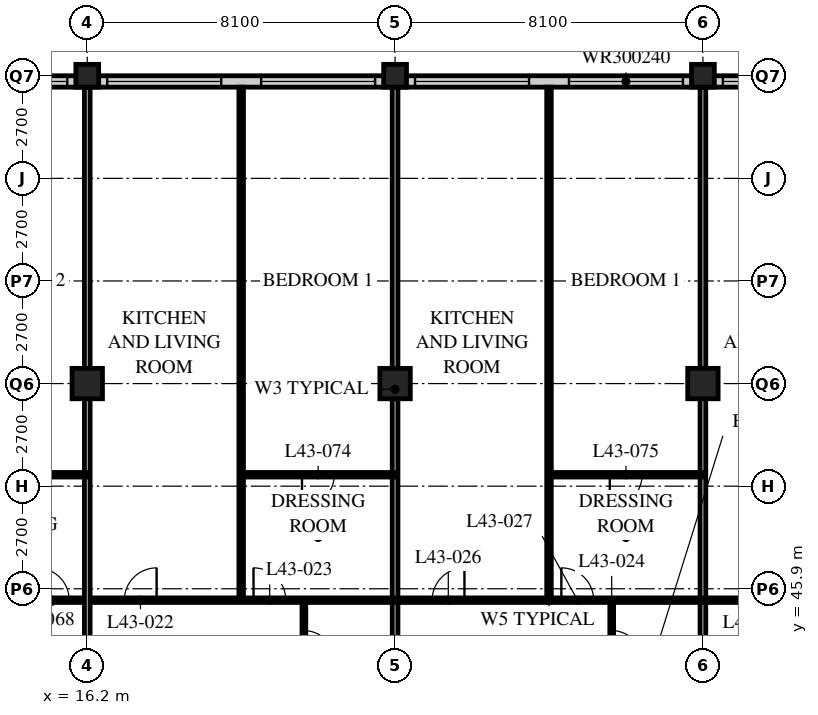
"""IFC4 building model, lengths in metres.
Left out: names, types, materials, properties, quantities, classifications, styles, units other than length and angle.
Written with IfcOpenShell. Run it as: python <this file> out.ifc"""

import sys

from ifc_helpers import new_model, si_unit, direction, frame, frame_2d, origin, origin_2d, place, context, subcontext, project, spatial, rectangle, hollow_rectangle, extrude, element, fill, save


model = new_model("IFC4")
c1 = context("Model", 3, precision=1e-05, world=origin(), true_north=direction((0.0, 1.0)))
c2 = subcontext(c1, "Body", "Model", "MODEL_VIEW")
j1 = project(units=[si_unit("LENGTHUNIT", "METRE"), si_unit("PLANEANGLEUNIT", "RADIAN")], contexts=[c1])
p1 = place(None, origin())
s1 = spatial("IfcSite", under=j1, at=p1, CompositionType="ELEMENT")
p2 = place(p1, origin())
s2 = spatial("IfcBuilding", under=s1, at=p2, CompositionType="ELEMENT")
p3 = place(p2, frame((0.0, 0.0, 170.4)))
s3 = spatial("IfcBuildingStorey", under=s2, at=p3, CompositionType="ELEMENT", Elevation=170.4)
p4 = place(p3, frame((16.2, 51.3, 0.0), z_axis=(0.0, 0.0, 1.0), x_axis=(1.0, 0.0, 0.0)))
e1 = element("IfcColumn", 1, at=p4, inside=s3, PredefinedType="COLUMN", context=c2, shape_type="SweptSolid", body=[
    extrude(hollow_rectangle(XDim=0.8, YDim=0.8, WallThickness=0.08, at=origin_2d()), origin(), (0.0, 0.0, 1.0), 3.6),
])
p5 = place(p3, frame((16.2, 59.4, 0.0), z_axis=(0.0, 0.0, 1.0), x_axis=(1.0, 0.0, 0.0)))
e2 = element("IfcColumn", 2, at=p5, inside=s3, PredefinedType="COLUMN", context=c2, shape_type="SweptSolid", body=[
    extrude(hollow_rectangle(XDim=0.6, YDim=0.6, WallThickness=0.05, at=origin_2d()), origin(), (0.0, 0.0, 1.0), 3.6),
])
p6 = place(p3, frame((24.3, 51.3, 0.0), z_axis=(0.0, 0.0, 1.0), x_axis=(1.0, 0.0, 0.0)))
e3 = element("IfcColumn", 3, at=p6, inside=s3, PredefinedType="COLUMN", context=c2, shape_type="SweptSolid", body=[
    extrude(hollow_rectangle(XDim=0.8, YDim=0.8, WallThickness=0.08, at=origin_2d()), origin(), (0.0, 0.0, 1.0), 3.6),
])
p7 = place(p3, frame((24.3, 59.4, 0.0), z_axis=(0.0, 0.0, 1.0), x_axis=(1.0, 0.0, 0.0)))
e4 = element("IfcColumn", 4, at=p7, inside=s3, PredefinedType="COLUMN", context=c2, shape_type="SweptSolid", body=[
    extrude(hollow_rectangle(XDim=0.6, YDim=0.6, WallThickness=0.05, at=origin_2d()), origin(), (0.0, 0.0, 1.0), 3.6),
])
p8 = place(p3, frame((32.4, 51.3, 0.0), z_axis=(0.0, 0.0, 1.0), x_axis=(1.0, 0.0, 0.0)))
e5 = element("IfcColumn", 5, at=p8, inside=s3, PredefinedType="COLUMN", context=c2, shape_type="SweptSolid", body=[
    extrude(hollow_rectangle(XDim=0.8, YDim=0.8, WallThickness=0.08, at=origin_2d()), origin(), (0.0, 0.0, 1.0), 3.6),
])
p9 = place(p3, frame((32.4, 59.4, 0.0), z_axis=(0.0, 0.0, 1.0), x_axis=(1.0, 0.0, 0.0)))
e6 = element("IfcColumn", 6, at=p9, inside=s3, PredefinedType="COLUMN", context=c2, shape_type="SweptSolid", body=[
    extrude(hollow_rectangle(XDim=0.6, YDim=0.6, WallThickness=0.05, at=origin_2d()), origin(), (0.0, 0.0, 1.0), 3.6),
])
p10 = place(p3, frame((48.3, 59.25, 0.0), z_axis=(0.0, 0.0, 1.0), x_axis=(-1.0, 0.0, 0.0)))
e7 = element("IfcWall", 7, at=p10, inside=s3, PredefinedType="SOLIDWALL", context=c2, shape_type="SweptSolid", body=[
    extrude(rectangle(XDim=40.2, YDim=0.3, at=frame_2d((20.1, 0.0))), origin(), (0.0, 0.0, 1.0), 3.39),
])
p11 = place(p10, frame((0.225, 0.0, 0.6)))
e8 = element("IfcOpeningElement", 8, at=p11, cuts=e7, PredefinedType="OPENING", context=c2, shape_type="SweptSolid", body=[
    extrude(rectangle(XDim=3.0, YDim=2.4, at=frame_2d((1.5, 1.2))), frame((0.0, 0.16, 0.0), z_axis=(0.0, -1.0, 0.0), x_axis=(1.0, 0.0, 0.0)), (0.0, 0.0, 1.0), 0.32),
])
p12 = place(p10, frame((4.275, 0.0, 0.6)))
e9 = element("IfcOpeningElement", 9, at=p12, cuts=e7, PredefinedType="OPENING", context=c2, shape_type="SweptSolid", body=[
    extrude(rectangle(XDim=3.0, YDim=2.4, at=frame_2d((1.5, 1.2))), frame((0.0, 0.16, 0.0), z_axis=(0.0, -1.0, 0.0), x_axis=(1.0, 0.0, 0.0)), (0.0, 0.0, 1.0), 0.32),
])
p13 = place(p10, frame((8.325, 0.0, 0.6)))
e10 = element("IfcOpeningElement", 10, at=p13, cuts=e7, PredefinedType="OPENING", context=c2, shape_type="SweptSolid", body=[
    extrude(rectangle(XDim=3.0, YDim=2.4, at=frame_2d((1.5, 1.2))), frame((0.0, 0.16, 0.0), z_axis=(0.0, -1.0, 0.0), x_axis=(1.0, 0.0, 0.0)), (0.0, 0.0, 1.0), 0.32),
])
p14 = place(p10, frame((12.375, 0.0, 0.6)))
e11 = element("IfcOpeningElement", 11, at=p14, cuts=e7, PredefinedType="OPENING", context=c2, shape_type="SweptSolid", body=[
    extrude(rectangle(XDim=3.0, YDim=2.4, at=frame_2d((1.5, 1.2))), frame((0.0, 0.16, 0.0), z_axis=(0.0, -1.0, 0.0), x_axis=(1.0, 0.0, 0.0)), (0.0, 0.0, 1.0), 0.32),
])
p15 = place(p10, frame((16.425, 0.0, 0.6)))
e12 = element("IfcOpeningElement", 12, at=p15, cuts=e7, PredefinedType="OPENING", context=c2, shape_type="SweptSolid", body=[
    extrude(rectangle(XDim=3.0, YDim=2.4, at=frame_2d((1.5, 1.2))), frame((0.0, 0.16, 0.0), z_axis=(0.0, -1.0, 0.0), x_axis=(1.0, 0.0, 0.0)), (0.0, 0.0, 1.0), 0.32),
])
p16 = place(p10, frame((20.475, 0.0, 0.6)))
e13 = element("IfcOpeningElement", 13, at=p16, cuts=e7, PredefinedType="OPENING", context=c2, shape_type="SweptSolid", body=[
    extrude(rectangle(XDim=3.0, YDim=2.4, at=frame_2d((1.5, 1.2))), frame((0.0, 0.16, 0.0), z_axis=(0.0, -1.0, 0.0), x_axis=(1.0, 0.0, 0.0)), (0.0, 0.0, 1.0), 0.32),
])
p17 = place(p10, frame((24.525, 0.0, 0.6)))
e14 = element("IfcOpeningElement", 14, at=p17, cuts=e7, PredefinedType="OPENING", context=c2, shape_type="SweptSolid", body=[
    extrude(rectangle(XDim=3.0, YDim=2.4, at=frame_2d((1.5, 1.2))), frame((0.0, 0.16, 0.0), z_axis=(0.0, -1.0, 0.0), x_axis=(1.0, 0.0, 0.0)), (0.0, 0.0, 1.0), 0.32),
])
p18 = place(p10, frame((28.575, 0.0, 0.6)))
e15 = element("IfcOpeningElement", 15, at=p18, cuts=e7, PredefinedType="OPENING", context=c2, shape_type="SweptSolid", body=[
    extrude(rectangle(XDim=3.0, YDim=2.4, at=frame_2d((1.5, 1.2))), frame((0.0, 0.16, 0.0), z_axis=(0.0, -1.0, 0.0), x_axis=(1.0, 0.0, 0.0)), (0.0, 0.0, 1.0), 0.32),
])
p19 = place(p10, frame((32.625, 0.0, 0.6)))
e16 = element("IfcOpeningElement", 16, at=p19, cuts=e7, PredefinedType="OPENING", context=c2, shape_type="SweptSolid", body=[
    extrude(rectangle(XDim=3.0, YDim=2.4, at=frame_2d((1.5, 1.2))), frame((0.0, 0.16, 0.0), z_axis=(0.0, -1.0, 0.0), x_axis=(1.0, 0.0, 0.0)), (0.0, 0.0, 1.0), 0.32),
])
p20 = place(p10, frame((36.675, 0.0, 0.6)))
e17 = element("IfcOpeningElement", 17, at=p20, cuts=e7, PredefinedType="OPENING", context=c2, shape_type="SweptSolid", body=[
    extrude(rectangle(XDim=3.0, YDim=2.4, at=frame_2d((1.5, 1.2))), frame((0.0, 0.16, 0.0), z_axis=(0.0, -1.0, 0.0), x_axis=(1.0, 0.0, 0.0)), (0.0, 0.0, 1.0), 0.32),
])
p21 = place(p3, frame((21.9, 43.2, 0.0), z_axis=(0.0, 0.0, 1.0), x_axis=(0.0, 1.0, 0.0)))
e18 = element("IfcWall", 18, at=p21, inside=s3, PredefinedType="PARTITIONING", context=c2, shape_type="SweptSolid", body=[
    extrude(rectangle(XDim=2.4, YDim=0.1, at=frame_2d((1.2, 0.0))), origin(), (0.0, 0.0, 1.0), 3.39),
])
p22 = place(p21, frame((0.8, 0.0, 0.0)))
e19 = element("IfcOpeningElement", 19, at=p22, cuts=e18, PredefinedType="OPENING", context=c2, shape_type="SweptSolid", body=[
    extrude(rectangle(XDim=0.8, YDim=2.1, at=frame_2d((0.4, 1.05))), frame((0.0, 0.06, 0.0), z_axis=(0.0, -1.0, 0.0), x_axis=(1.0, 0.0, 0.0)), (0.0, 0.0, 1.0), 0.12),
])
p23 = place(p3, frame((20.25, 45.6, 0.0), z_axis=(0.0, 0.0, 1.0), x_axis=(0.0, 1.0, 0.0)))
e20 = element("IfcWall", 20, at=p23, inside=s3, PredefinedType="PARTITIONING", context=c2, shape_type="SweptSolid", body=[
    extrude(rectangle(XDim=13.5, YDim=0.12, at=frame_2d((6.75, 0.0))), origin(), (0.0, 0.0, 1.0), 3.39),
])
p24 = place(p3, frame((24.3, 43.2, 0.0), z_axis=(0.0, 0.0, 1.0), x_axis=(0.0, 1.0, 0.0)))
e21 = element("IfcWall", 21, at=p24, inside=s3, PredefinedType="PARTITIONING", context=c2, shape_type="SweptSolid", body=[
    extrude(rectangle(XDim=15.9, YDim=0.15, at=frame_2d((7.95, 0.0))), origin(), (0.0, 0.0, 1.0), 2.778),
])
p25 = place(p3, frame((30.0, 43.2, 0.0), z_axis=(0.0, 0.0, 1.0), x_axis=(0.0, 1.0, 0.0)))
e22 = element("IfcWall", 22, at=p25, inside=s3, PredefinedType="PARTITIONING", context=c2, shape_type="SweptSolid", body=[
    extrude(rectangle(XDim=2.4, YDim=0.1, at=frame_2d((1.2, 0.0))), origin(), (0.0, 0.0, 1.0), 3.39),
])
p26 = place(p25, frame((0.8, 0.0, 0.0)))
e23 = element("IfcOpeningElement", 23, at=p26, cuts=e22, PredefinedType="OPENING", context=c2, shape_type="SweptSolid", body=[
    extrude(rectangle(XDim=0.8, YDim=2.1, at=frame_2d((0.4, 1.05))), frame((0.0, 0.06, 0.0), z_axis=(0.0, -1.0, 0.0), x_axis=(1.0, 0.0, 0.0)), (0.0, 0.0, 1.0), 0.12),
])
p27 = place(p3, frame((28.35, 45.6, 0.0), z_axis=(0.0, 0.0, 1.0), x_axis=(0.0, 1.0, 0.0)))
e24 = element("IfcWall", 24, at=p27, inside=s3, PredefinedType="PARTITIONING", context=c2, shape_type="SweptSolid", body=[
    extrude(rectangle(XDim=13.5, YDim=0.12, at=frame_2d((6.75, 0.0))), origin(), (0.0, 0.0, 1.0), 3.39),
])
p28 = place(p3, frame((32.4, 43.2, 0.0), z_axis=(0.0, 0.0, 1.0), x_axis=(0.0, 1.0, 0.0)))
e25 = element("IfcWall", 25, at=p28, inside=s3, PredefinedType="PARTITIONING", context=c2, shape_type="SweptSolid", body=[
    extrude(rectangle(XDim=15.9, YDim=0.15, at=frame_2d((7.95, 0.0))), origin(), (0.0, 0.0, 1.0), 2.778),
])
p29 = place(p3, frame((8.15, 45.6, 0.0), z_axis=(0.0, 0.0, 1.0), x_axis=(1.0, 0.0, 0.0)))
e26 = element("IfcWall", 26, at=p29, inside=s3, PredefinedType="PARTITIONING", context=c2, shape_type="SweptSolid", body=[
    extrude(rectangle(XDim=40.4, YDim=0.12, at=frame_2d((20.2, 0.0))), origin(), (0.0, 0.0, 1.0), 3.39),
])
p30 = place(p29, frame((9.025, 0.0, 0.0)))
e27 = element("IfcOpeningElement", 27, at=p30, cuts=e26, PredefinedType="OPENING", context=c2, shape_type="SweptSolid", body=[
    extrude(rectangle(XDim=0.85, YDim=2.1, at=frame_2d((0.425, 1.05))), frame((0.0, 0.07, 0.0), z_axis=(0.0, -1.0, 0.0), x_axis=(1.0, 0.0, 0.0)), (0.0, 0.0, 1.0), 0.14),
])
p31 = place(p29, frame((12.425, 0.0, 0.0)))
e28 = element("IfcOpeningElement", 28, at=p31, cuts=e26, PredefinedType="OPENING", context=c2, shape_type="SweptSolid", body=[
    extrude(rectangle(XDim=0.85, YDim=2.1, at=frame_2d((0.425, 1.05))), frame((0.0, 0.07, 0.0), z_axis=(0.0, -1.0, 0.0), x_axis=(1.0, 0.0, 0.0)), (0.0, 0.0, 1.0), 0.14),
])
p32 = place(p29, frame((17.125, 0.0, 0.0)))
e29 = element("IfcOpeningElement", 29, at=p32, cuts=e26, PredefinedType="OPENING", context=c2, shape_type="SweptSolid", body=[
    extrude(rectangle(XDim=0.85, YDim=2.1, at=frame_2d((0.425, 1.05))), frame((0.0, 0.07, 0.0), z_axis=(0.0, -1.0, 0.0), x_axis=(1.0, 0.0, 0.0)), (0.0, 0.0, 1.0), 0.14),
])
p33 = place(p29, frame((20.525, 0.0, 0.0)))
e30 = element("IfcOpeningElement", 30, at=p33, cuts=e26, PredefinedType="OPENING", context=c2, shape_type="SweptSolid", body=[
    extrude(rectangle(XDim=0.85, YDim=2.1, at=frame_2d((0.425, 1.05))), frame((0.0, 0.07, 0.0), z_axis=(0.0, -1.0, 0.0), x_axis=(1.0, 0.0, 0.0)), (0.0, 0.0, 1.0), 0.14),
])
p34 = place(p29, frame((25.225, 0.0, 0.0)))
e31 = element("IfcOpeningElement", 31, at=p34, cuts=e26, PredefinedType="OPENING", context=c2, shape_type="SweptSolid", body=[
    extrude(rectangle(XDim=0.85, YDim=2.1, at=frame_2d((0.425, 1.05))), frame((0.0, 0.07, 0.0), z_axis=(0.0, -1.0, 0.0), x_axis=(1.0, 0.0, 0.0)), (0.0, 0.0, 1.0), 0.14),
])
p35 = place(p29, frame((28.625, 0.0, 0.0)))
e32 = element("IfcOpeningElement", 32, at=p35, cuts=e26, PredefinedType="OPENING", context=c2, shape_type="SweptSolid", body=[
    extrude(rectangle(XDim=0.85, YDim=2.1, at=frame_2d((0.425, 1.05))), frame((0.0, 0.07, 0.0), z_axis=(0.0, -1.0, 0.0), x_axis=(1.0, 0.0, 0.0)), (0.0, 0.0, 1.0), 0.14),
])
p36 = place(p29, frame((32.825, 0.0, 0.0)))
e33 = element("IfcOpeningElement", 33, at=p36, cuts=e26, PredefinedType="OPENING", context=c2, shape_type="SweptSolid", body=[
    extrude(rectangle(XDim=0.85, YDim=2.1, at=frame_2d((0.425, 1.05))), frame((0.0, 0.07, 0.0), z_axis=(0.0, -1.0, 0.0), x_axis=(1.0, 0.0, 0.0)), (0.0, 0.0, 1.0), 0.14),
])
p37 = place(p29, frame((36.675, 0.0, 0.0)))
e34 = element("IfcOpeningElement", 34, at=p37, cuts=e26, PredefinedType="OPENING", context=c2, shape_type="SweptSolid", body=[
    extrude(rectangle(XDim=0.85, YDim=2.1, at=frame_2d((0.425, 1.05))), frame((0.0, 0.07, 0.0), z_axis=(0.0, -1.0, 0.0), x_axis=(1.0, 0.0, 0.0)), (0.0, 0.0, 1.0), 0.14),
])
p38 = place(p29, frame((6.725, 0.0, 0.0)))
e35 = element("IfcOpeningElement", 35, at=p38, cuts=e26, PredefinedType="OPENING", context=c2, shape_type="SweptSolid", body=[
    extrude(rectangle(XDim=0.85, YDim=2.1, at=frame_2d((0.425, 1.05))), frame((0.0, 0.07, 0.0), z_axis=(0.0, -1.0, 0.0), x_axis=(1.0, 0.0, 0.0)), (0.0, 0.0, 1.0), 0.14),
])
p39 = place(p29, frame((2.875, 0.0, 0.0)))
e36 = element("IfcOpeningElement", 36, at=p39, cuts=e26, PredefinedType="OPENING", context=c2, shape_type="SweptSolid", body=[
    extrude(rectangle(XDim=0.85, YDim=2.1, at=frame_2d((0.425, 1.05))), frame((0.0, 0.07, 0.0), z_axis=(0.0, -1.0, 0.0), x_axis=(1.0, 0.0, 0.0)), (0.0, 0.0, 1.0), 0.14),
])
p40 = place(p3, frame((16.2, 43.2, 0.0), z_axis=(0.0, 0.0, 1.0), x_axis=(0.0, 1.0, 0.0)))
e37 = element("IfcWall", 37, at=p40, inside=s3, PredefinedType="PARTITIONING", context=c2, shape_type="SweptSolid", body=[
    extrude(rectangle(XDim=15.9, YDim=0.15, at=frame_2d((7.95, 0.0))), origin(), (0.0, 0.0, 1.0), 2.778),
])
p41 = place(p3, frame((20.25, 48.9, 0.0), z_axis=(0.0, 0.0, 1.0), x_axis=(1.0, 0.0, 0.0)))
e38 = element("IfcWall", 38, at=p41, inside=s3, PredefinedType="PARTITIONING", context=c2, shape_type="SweptSolid", body=[
    extrude(rectangle(XDim=4.05, YDim=0.12, at=frame_2d((2.025, 0.0))), origin(), (0.0, 0.0, 1.0), 3.39),
])
p42 = place(p41, frame((1.6, 0.0, 0.0)))
e39 = element("IfcOpeningElement", 39, at=p42, cuts=e38, PredefinedType="OPENING", context=c2, shape_type="SweptSolid", body=[
    extrude(rectangle(XDim=0.85, YDim=2.1, at=frame_2d((0.425, 1.05))), frame((0.0, 0.07, 0.0), z_axis=(0.0, -1.0, 0.0), x_axis=(1.0, 0.0, 0.0)), (0.0, 0.0, 1.0), 0.14),
])
p43 = place(p3, frame((28.35, 48.9, 0.0), z_axis=(0.0, 0.0, 1.0), x_axis=(1.0, 0.0, 0.0)))
e40 = element("IfcWall", 40, at=p43, inside=s3, PredefinedType="PARTITIONING", context=c2, shape_type="SweptSolid", body=[
    extrude(rectangle(XDim=4.05, YDim=0.12, at=frame_2d((2.025, 0.0))), origin(), (0.0, 0.0, 1.0), 3.39),
])
p44 = place(p43, frame((1.6, 0.0, 0.0)))
e41 = element("IfcOpeningElement", 41, at=p44, cuts=e40, PredefinedType="OPENING", context=c2, shape_type="SweptSolid", body=[
    extrude(rectangle(XDim=0.85, YDim=2.1, at=frame_2d((0.425, 1.05))), frame((0.0, 0.07, 0.0), z_axis=(0.0, -1.0, 0.0), x_axis=(1.0, 0.0, 0.0)), (0.0, 0.0, 1.0), 0.14),
])
p45 = place(p3, frame((12.15, 48.9, 0.0), z_axis=(0.0, 0.0, 1.0), x_axis=(1.0, 0.0, 0.0)))
e42 = element("IfcWall", 42, at=p45, inside=s3, PredefinedType="PARTITIONING", context=c2, shape_type="SweptSolid", body=[
    extrude(rectangle(XDim=4.05, YDim=0.12, at=frame_2d((2.025, 0.0))), origin(), (0.0, 0.0, 1.0), 3.39),
])
p46 = place(p45, frame((1.6, 0.0, 0.0)))
e43 = element("IfcOpeningElement", 43, at=p46, cuts=e42, PredefinedType="OPENING", context=c2, shape_type="SweptSolid", body=[
    extrude(rectangle(XDim=0.85, YDim=2.1, at=frame_2d((0.425, 1.05))), frame((0.0, 0.07, 0.0), z_axis=(0.0, -1.0, 0.0), x_axis=(1.0, 0.0, 0.0)), (0.0, 0.0, 1.0), 0.14),
])
p47 = place(p14, origin())
e44 = element("IfcWindow", 44, at=p47, inside=s3, PartitioningType="SINGLE_PANEL", PredefinedType="WINDOW", context=c2, shape_type="SweptSolid", body=[
    extrude(rectangle(XDim=3.0, YDim=2.4, at=frame_2d((1.5, 1.2))), frame((0.0, 0.03, 0.0), z_axis=(0.0, -1.0, 0.0), x_axis=(1.0, 0.0, 0.0)), (0.0, 0.0, 1.0), 0.06),
])
fill(e11, e44)
p48 = place(p15, origin())
e45 = element("IfcWindow", 45, at=p48, inside=s3, PartitioningType="SINGLE_PANEL", PredefinedType="WINDOW", context=c2, shape_type="SweptSolid", body=[
    extrude(rectangle(XDim=3.0, YDim=2.4, at=frame_2d((1.5, 1.2))), frame((0.0, 0.03, 0.0), z_axis=(0.0, -1.0, 0.0), x_axis=(1.0, 0.0, 0.0)), (0.0, 0.0, 1.0), 0.06),
])
fill(e12, e45)
p49 = place(p16, origin())
e46 = element("IfcWindow", 46, at=p49, inside=s3, PartitioningType="SINGLE_PANEL", PredefinedType="WINDOW", context=c2, shape_type="SweptSolid", body=[
    extrude(rectangle(XDim=3.0, YDim=2.4, at=frame_2d((1.5, 1.2))), frame((0.0, 0.03, 0.0), z_axis=(0.0, -1.0, 0.0), x_axis=(1.0, 0.0, 0.0)), (0.0, 0.0, 1.0), 0.06),
])
fill(e13, e46)
p50 = place(p17, origin())
e47 = element("IfcWindow", 47, at=p50, inside=s3, PartitioningType="SINGLE_PANEL", PredefinedType="WINDOW", context=c2, shape_type="SweptSolid", body=[
    extrude(rectangle(XDim=3.0, YDim=2.4, at=frame_2d((1.5, 1.2))), frame((0.0, 0.03, 0.0), z_axis=(0.0, -1.0, 0.0), x_axis=(1.0, 0.0, 0.0)), (0.0, 0.0, 1.0), 0.06),
])
fill(e14, e47)
p51 = place(p18, origin())
e48 = element("IfcWindow", 48, at=p51, inside=s3, PartitioningType="SINGLE_PANEL", PredefinedType="WINDOW", context=c2, shape_type="SweptSolid", body=[
    extrude(rectangle(XDim=3.0, YDim=2.4, at=frame_2d((1.5, 1.2))), frame((0.0, 0.03, 0.0), z_axis=(0.0, -1.0, 0.0), x_axis=(1.0, 0.0, 0.0)), (0.0, 0.0, 1.0), 0.06),
])
fill(e15, e48)
p52 = place(p19, origin())
e49 = element("IfcWindow", 49, at=p52, inside=s3, PartitioningType="SINGLE_PANEL", PredefinedType="WINDOW", context=c2, shape_type="SweptSolid", body=[
    extrude(rectangle(XDim=3.0, YDim=2.4, at=frame_2d((1.5, 1.2))), frame((0.0, 0.03, 0.0), z_axis=(0.0, -1.0, 0.0), x_axis=(1.0, 0.0, 0.0)), (0.0, 0.0, 1.0), 0.06),
])
fill(e16, e49)
p53 = place(p22, origin())
e50 = element("IfcDoor", 50, at=p53, inside=s3, OperationType="SINGLE_SWING_RIGHT", PredefinedType="DOOR", context=c2, shape_type="SweptSolid", body=[
    extrude(rectangle(XDim=0.8, YDim=2.1, at=frame_2d((0.4, 1.05))), frame((0.0, 0.025, 0.0), z_axis=(0.0, -1.0, 0.0), x_axis=(1.0, 0.0, 0.0)), (0.0, 0.0, 1.0), 0.05),
])
fill(e19, e50)
p54 = place(p30, origin())
e51 = element("IfcDoor", 51, at=p54, inside=s3, OperationType="SINGLE_SWING_RIGHT", PredefinedType="DOOR", context=c2, shape_type="SweptSolid", body=[
    extrude(rectangle(XDim=0.85, YDim=2.1, at=frame_2d((0.425, 1.05))), frame((0.0, 0.025, 0.0), z_axis=(0.0, -1.0, 0.0), x_axis=(1.0, 0.0, 0.0)), (0.0, 0.0, 1.0), 0.05),
])
fill(e27, e51)
p55 = place(p31, origin())
e52 = element("IfcDoor", 52, at=p55, inside=s3, OperationType="SINGLE_SWING_LEFT", PredefinedType="DOOR", context=c2, shape_type="SweptSolid", body=[
    extrude(rectangle(XDim=0.85, YDim=2.1, at=frame_2d((0.425, 1.05))), frame((0.0, 0.025, 0.0), z_axis=(0.0, -1.0, 0.0), x_axis=(1.0, 0.0, 0.0)), (0.0, 0.0, 1.0), 0.05),
])
fill(e28, e52)
p56 = place(p26, origin())
e53 = element("IfcDoor", 53, at=p56, inside=s3, OperationType="SINGLE_SWING_RIGHT", PredefinedType="DOOR", context=c2, shape_type="SweptSolid", body=[
    extrude(rectangle(XDim=0.8, YDim=2.1, at=frame_2d((0.4, 1.05))), frame((0.0, 0.025, 0.0), z_axis=(0.0, -1.0, 0.0), x_axis=(1.0, 0.0, 0.0)), (0.0, 0.0, 1.0), 0.05),
])
fill(e23, e53)
p57 = place(p32, origin())
e54 = element("IfcDoor", 54, at=p57, inside=s3, OperationType="SINGLE_SWING_RIGHT", PredefinedType="DOOR", context=c2, shape_type="SweptSolid", body=[
    extrude(rectangle(XDim=0.85, YDim=2.1, at=frame_2d((0.425, 1.05))), frame((0.0, 0.025, 0.0), z_axis=(0.0, -1.0, 0.0), x_axis=(1.0, 0.0, 0.0)), (0.0, 0.0, 1.0), 0.05),
])
fill(e29, e54)
p58 = place(p33, origin())
e55 = element("IfcDoor", 55, at=p58, inside=s3, OperationType="SINGLE_SWING_LEFT", PredefinedType="DOOR", context=c2, shape_type="SweptSolid", body=[
    extrude(rectangle(XDim=0.85, YDim=2.1, at=frame_2d((0.425, 1.05))), frame((0.0, 0.025, 0.0), z_axis=(0.0, -1.0, 0.0), x_axis=(1.0, 0.0, 0.0)), (0.0, 0.0, 1.0), 0.05),
])
fill(e30, e55)
p59 = place(p38, origin())
e56 = element("IfcDoor", 56, at=p59, inside=s3, OperationType="SINGLE_SWING_LEFT", PredefinedType="DOOR", context=c2, shape_type="SweptSolid", body=[
    extrude(rectangle(XDim=0.85, YDim=2.1, at=frame_2d((0.425, 1.05))), frame((0.0, 0.025, 0.0), z_axis=(0.0, -1.0, 0.0), x_axis=(1.0, 0.0, 0.0)), (0.0, 0.0, 1.0), 0.05),
])
fill(e35, e56)
p60 = place(p42, origin())
e57 = element("IfcDoor", 57, at=p60, inside=s3, OperationType="SINGLE_SWING_RIGHT", PredefinedType="DOOR", context=c2, shape_type="SweptSolid", body=[
    extrude(rectangle(XDim=0.85, YDim=2.1, at=frame_2d((0.425, 1.05))), frame((0.0, 0.025, 0.0), z_axis=(0.0, -1.0, 0.0), x_axis=(1.0, 0.0, 0.0)), (0.0, 0.0, 1.0), 0.05),
])
fill(e39, e57)
p61 = place(p44, origin())
e58 = element("IfcDoor", 58, at=p61, inside=s3, OperationType="SINGLE_SWING_RIGHT", PredefinedType="DOOR", context=c2, shape_type="SweptSolid", body=[
    extrude(rectangle(XDim=0.85, YDim=2.1, at=frame_2d((0.425, 1.05))), frame((0.0, 0.025, 0.0), z_axis=(0.0, -1.0, 0.0), x_axis=(1.0, 0.0, 0.0)), (0.0, 0.0, 1.0), 0.05),
])
fill(e41, e58)
save(model, sys.argv[1])
